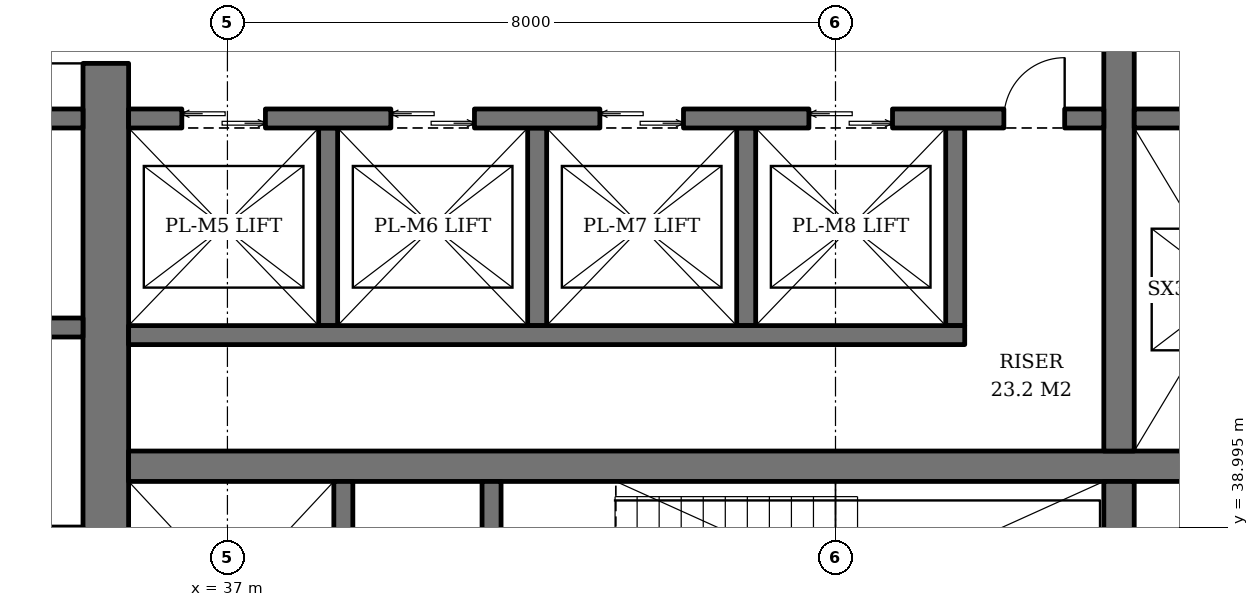
"""IFC4 building model, lengths in metres.
Left out: names, types, materials, properties, quantities, classifications, styles, units other than length and angle.
Written with IfcOpenShell. Run it as: python <this file> out.ifc"""

import sys

from ifc_helpers import new_model, si_unit, direction, frame, frame_2d, origin, place, context, subcontext, project, spatial, rectangle, extrude, element, fill, save


model = new_model("IFC4")
c1 = context("Model", 3, precision=1e-05, world=origin(), true_north=direction((0.0, 1.0)))
c2 = subcontext(c1, "Body", "Model", "MODEL_VIEW")
j1 = project(units=[si_unit("LENGTHUNIT", "METRE"), si_unit("PLANEANGLEUNIT", "RADIAN")], contexts=[c1])
p1 = place(None, origin())
s1 = spatial("IfcSite", under=j1, at=p1, CompositionType="ELEMENT")
p2 = place(p1, origin())
s2 = spatial("IfcBuilding", under=s1, at=p2, CompositionType="ELEMENT")
p3 = place(p2, frame((0.0, 0.0, 112.2)))
s3 = spatial("IfcBuildingStorey", under=s2, at=p3, CompositionType="ELEMENT", Elevation=112.2)
p4 = place(p3, frame((35.4, 36.7, 0.0), z_axis=(0.0, 0.0, 1.0), x_axis=(0.0, 1.0, 0.0)))
e1 = element("IfcWall", 1, at=p4, inside=s3, PredefinedType="SHEAR", context=c2, shape_type="SweptSolid", body=[
    extrude(rectangle(XDim=18.6, YDim=0.6, at=frame_2d((9.3, 0.0))), origin(), (0.0, 0.0, 1.0), 3.8),
])
p5 = place(p4, frame((8.4, 0.0, 0.0)))
e2 = element("IfcOpeningElement", 2, at=p5, cuts=e1, PredefinedType="OPENING", context=c2, shape_type="SweptSolid", body=[
    extrude(rectangle(XDim=1.8, YDim=2.4, at=frame_2d((0.9, 1.2))), frame((0.0, 0.31, 0.0), z_axis=(0.0, -1.0, 0.0), x_axis=(1.0, 0.0, 0.0)), (0.0, 0.0, 1.0), 0.62),
])
p6 = place(p3, frame((35.7, 39.8, 0.0), z_axis=(0.0, 0.0, 1.0), x_axis=(1.0, 0.0, 0.0)))
e3 = element("IfcWall", 3, at=p6, inside=s3, PredefinedType="SHEAR", context=c2, shape_type="SweptSolid", body=[
    extrude(rectangle(XDim=18.6, YDim=0.4, at=frame_2d((9.3, 0.0))), origin(), (0.0, 0.0, 1.0), 3.8),
])
p7 = place(p3, frame((48.73, 36.7, 0.0), z_axis=(0.0, 0.0, 1.0), x_axis=(0.0, 1.0, 0.0)))
e4 = element("IfcWall", 4, at=p7, inside=s3, PredefinedType="SHEAR", context=c2, shape_type="SweptSolid", body=[
    extrude(rectangle(XDim=2.9, YDim=0.4, at=frame_2d((1.45, 0.0))), origin(), (0.0, 0.0, 1.0), 3.8),
])
p8 = place(p3, frame((48.73, 40.0, 0.0), z_axis=(0.0, 0.0, 1.0), x_axis=(0.0, 1.0, 0.0)))
e5 = element("IfcWall", 5, at=p8, inside=s3, PredefinedType="SHEAR", context=c2, shape_type="SweptSolid", body=[
    extrude(rectangle(XDim=12.0, YDim=0.4, at=frame_2d((6.0, 0.0))), origin(), (0.0, 0.0, 1.0), 3.8),
])
p9 = place(p3, frame((38.525, 36.7, 0.0), z_axis=(0.0, 0.0, 1.0), x_axis=(0.0, 1.0, 0.0)))
e6 = element("IfcWall", 6, at=p9, inside=s3, PredefinedType="SHEAR", context=c2, shape_type="SweptSolid", body=[
    extrude(rectangle(XDim=2.9, YDim=0.25, at=frame_2d((1.45, 0.0))), origin(), (0.0, 0.0, 1.0), 3.8),
])
p10 = place(p9, frame((0.8, 0.0, 0.0)))
e7 = element("IfcOpeningElement", 7, at=p10, cuts=e6, PredefinedType="OPENING", context=c2, shape_type="SweptSolid", body=[
    extrude(rectangle(XDim=1.3, YDim=2.2, at=frame_2d((0.65, 1.1))), frame((0.0, 0.135, 0.0), z_axis=(0.0, -1.0, 0.0), x_axis=(1.0, 0.0, 0.0)), (0.0, 0.0, 1.0), 0.27),
])
p11 = place(p3, frame((40.475, 36.7, 0.0), z_axis=(0.0, 0.0, 1.0), x_axis=(0.0, 1.0, 0.0)))
e8 = element("IfcWall", 8, at=p11, inside=s3, PredefinedType="SHEAR", context=c2, shape_type="SweptSolid", body=[
    extrude(rectangle(XDim=2.9, YDim=0.25, at=frame_2d((1.45, 0.0))), origin(), (0.0, 0.0, 1.0), 3.8),
])
p12 = place(p11, frame((0.75, 0.0, 0.0)))
e9 = element("IfcOpeningElement", 9, at=p12, cuts=e8, PredefinedType="OPENING", context=c2, shape_type="SweptSolid", body=[
    extrude(rectangle(XDim=1.2, YDim=2.1, at=frame_2d((0.6, 1.05))), frame((0.0, 0.135, 0.0), z_axis=(0.0, -1.0, 0.0), x_axis=(1.0, 0.0, 0.0)), (0.0, 0.0, 1.0), 0.27),
])
for number, where, z_axis, x_axis in (
    (10, (38.325, 44.25, 0.0), (0.0, 0.0, 1.0), (0.0, -1.0, 0.0)),
    (11, (41.075, 44.25, 0.0), (0.0, 0.0, 1.0), (0.0, -1.0, 0.0)),
    (12, (43.825, 44.25, 0.0), (0.0, 0.0, 1.0), (0.0, -1.0, 0.0)),
    (13, (46.575, 44.25, 0.0), (0.0, 0.0, 1.0), (0.0, -1.0, 0.0)),
):
    element("IfcWall", number, at=place(p3, frame(where, z_axis=z_axis, x_axis=x_axis)), inside=s3, PredefinedType="SHEAR", context=c2, shape_type="SweptSolid", body=[
        extrude(rectangle(XDim=2.6, YDim=0.25, at=frame_2d((1.3, 0.0))), origin(), (0.0, 0.0, 1.0), 3.8),
    ])
p13 = place(p3, frame((35.7, 41.525, 0.0), z_axis=(0.0, 0.0, 1.0), x_axis=(1.0, 0.0, 0.0)))
e14 = element("IfcWall", 14, at=p13, inside=s3, PredefinedType="SHEAR", context=c2, shape_type="SweptSolid", body=[
    extrude(rectangle(XDim=11.0, YDim=0.25, at=frame_2d((5.5, 0.0))), origin(), (0.0, 0.0, 1.0), 3.8),
])
p14 = place(p3, frame((35.7, 44.375, 0.0), z_axis=(0.0, 0.0, 1.0), x_axis=(1.0, 0.0, 0.0)))
e15 = element("IfcWall", 15, at=p14, inside=s3, PredefinedType="SHEAR", context=c2, shape_type="SweptSolid", body=[
    extrude(rectangle(XDim=12.83, YDim=0.25, at=frame_2d((6.415, 0.0))), origin(), (0.0, 0.0, 1.0), 3.8),
])
p15 = place(p14, frame((0.7, 0.0, 0.0)))
e16 = element("IfcOpeningElement", 16, at=p15, cuts=e15, PredefinedType="OPENING", context=c2, shape_type="SweptSolid", body=[
    extrude(rectangle(XDim=1.1, YDim=2.2, at=frame_2d((0.55, 1.1))), frame((0.0, 0.135, 0.0), z_axis=(0.0, -1.0, 0.0), x_axis=(1.0, 0.0, 0.0)), (0.0, 0.0, 1.0), 0.27),
])
p16 = place(p14, frame((3.45, 0.0, 0.0)))
e17 = element("IfcOpeningElement", 17, at=p16, cuts=e15, PredefinedType="OPENING", context=c2, shape_type="SweptSolid", body=[
    extrude(rectangle(XDim=1.1, YDim=2.2, at=frame_2d((0.55, 1.1))), frame((0.0, 0.135, 0.0), z_axis=(0.0, -1.0, 0.0), x_axis=(1.0, 0.0, 0.0)), (0.0, 0.0, 1.0), 0.27),
])
p17 = place(p14, frame((6.2, 0.0, 0.0)))
e18 = element("IfcOpeningElement", 18, at=p17, cuts=e15, PredefinedType="OPENING", context=c2, shape_type="SweptSolid", body=[
    extrude(rectangle(XDim=1.1, YDim=2.2, at=frame_2d((0.55, 1.1))), frame((0.0, 0.135, 0.0), z_axis=(0.0, -1.0, 0.0), x_axis=(1.0, 0.0, 0.0)), (0.0, 0.0, 1.0), 0.27),
])
p18 = place(p14, frame((8.95, 0.0, 0.0)))
e19 = element("IfcOpeningElement", 19, at=p18, cuts=e15, PredefinedType="OPENING", context=c2, shape_type="SweptSolid", body=[
    extrude(rectangle(XDim=1.1, YDim=2.2, at=frame_2d((0.55, 1.1))), frame((0.0, 0.135, 0.0), z_axis=(0.0, -1.0, 0.0), x_axis=(1.0, 0.0, 0.0)), (0.0, 0.0, 1.0), 0.27),
])
p19 = place(p14, frame((11.515, 0.0, 0.0)))
e20 = element("IfcOpeningElement", 20, at=p19, cuts=e15, PredefinedType="OPENING", context=c2, shape_type="SweptSolid", body=[
    extrude(rectangle(XDim=0.8, YDim=2.0, at=frame_2d((0.4, 1.0))), frame((0.0, 0.135, 0.0), z_axis=(0.0, -1.0, 0.0), x_axis=(1.0, 0.0, 0.0)), (0.0, 0.0, 1.0), 0.27),
])
p20 = place(p3, frame((48.93, 44.375, 0.0), z_axis=(0.0, 0.0, 1.0), x_axis=(1.0, 0.0, 0.0)))
e21 = element("IfcWall", 21, at=p20, inside=s3, PredefinedType="SHEAR", context=c2, shape_type="SweptSolid", body=[
    extrude(rectangle(XDim=5.37, YDim=0.25, at=frame_2d((2.685, 0.0))), origin(), (0.0, 0.0, 1.0), 3.8),
])
for number, where, z_axis, x_axis in (
    (22, (32.4, 41.625, 0.0), (0.0, 0.0, 1.0), (1.0, 0.0, 0.0)),
    (23, (32.4, 44.375, 0.0), (0.0, 0.0, 1.0), (1.0, 0.0, 0.0)),
):
    element("IfcWall", number, at=place(p3, frame(where, z_axis=z_axis, x_axis=x_axis)), inside=s3, PredefinedType="SHEAR", context=c2, shape_type="SweptSolid", body=[
        extrude(rectangle(XDim=2.7, YDim=0.25, at=frame_2d((1.35, 0.0))), origin(), (0.0, 0.0, 1.0), 3.8),
    ])
p21 = place(p15, origin())
e24 = element("IfcDoor", 24, at=p21, inside=s3, OperationType="DOUBLE_DOOR_SLIDING", PredefinedType="DOOR", context=c2, shape_type="SweptSolid", body=[
    extrude(rectangle(XDim=1.1, YDim=2.2, at=frame_2d((0.55, 1.1))), frame((0.0, 0.025, 0.0), z_axis=(0.0, -1.0, 0.0), x_axis=(1.0, 0.0, 0.0)), (0.0, 0.0, 1.0), 0.05),
])
fill(e16, e24)
p22 = place(p16, origin())
e25 = element("IfcDoor", 25, at=p22, inside=s3, OperationType="DOUBLE_DOOR_SLIDING", PredefinedType="DOOR", context=c2, shape_type="SweptSolid", body=[
    extrude(rectangle(XDim=1.1, YDim=2.2, at=frame_2d((0.55, 1.1))), frame((0.0, 0.025, 0.0), z_axis=(0.0, -1.0, 0.0), x_axis=(1.0, 0.0, 0.0)), (0.0, 0.0, 1.0), 0.05),
])
fill(e17, e25)
p23 = place(p17, origin())
e26 = element("IfcDoor", 26, at=p23, inside=s3, OperationType="DOUBLE_DOOR_SLIDING", PredefinedType="DOOR", context=c2, shape_type="SweptSolid", body=[
    extrude(rectangle(XDim=1.1, YDim=2.2, at=frame_2d((0.55, 1.1))), frame((0.0, 0.025, 0.0), z_axis=(0.0, -1.0, 0.0), x_axis=(1.0, 0.0, 0.0)), (0.0, 0.0, 1.0), 0.05),
])
fill(e18, e26)
p24 = place(p18, origin())
e27 = element("IfcDoor", 27, at=p24, inside=s3, OperationType="DOUBLE_DOOR_SLIDING", PredefinedType="DOOR", context=c2, shape_type="SweptSolid", body=[
    extrude(rectangle(XDim=1.1, YDim=2.2, at=frame_2d((0.55, 1.1))), frame((0.0, 0.025, 0.0), z_axis=(0.0, -1.0, 0.0), x_axis=(1.0, 0.0, 0.0)), (0.0, 0.0, 1.0), 0.05),
])
fill(e19, e27)
p25 = place(p19, origin())
e28 = element("IfcDoor", 28, at=p25, inside=s3, OperationType="SINGLE_SWING_RIGHT", PredefinedType="DOOR", context=c2, shape_type="SweptSolid", body=[
    extrude(rectangle(XDim=0.8, YDim=2.0, at=frame_2d((0.4, 1.0))), frame((0.0, 0.025, 0.0), z_axis=(0.0, -1.0, 0.0), x_axis=(1.0, 0.0, 0.0)), (0.0, 0.0, 1.0), 0.05),
])
fill(e20, e28)
p26 = place(p5, origin())
e29 = element("IfcDoor", 29, at=p26, inside=s3, OperationType="DOUBLE_DOOR_SINGLE_SWING", PredefinedType="DOOR", context=c2, shape_type="SweptSolid", body=[
    extrude(rectangle(XDim=1.8, YDim=2.4, at=frame_2d((0.9, 1.2))), frame((0.0, 0.025, 0.0), z_axis=(0.0, -1.0, 0.0), x_axis=(1.0, 0.0, 0.0)), (0.0, 0.0, 1.0), 0.05),
])
fill(e2, e29)
save(model, sys.argv[1])
